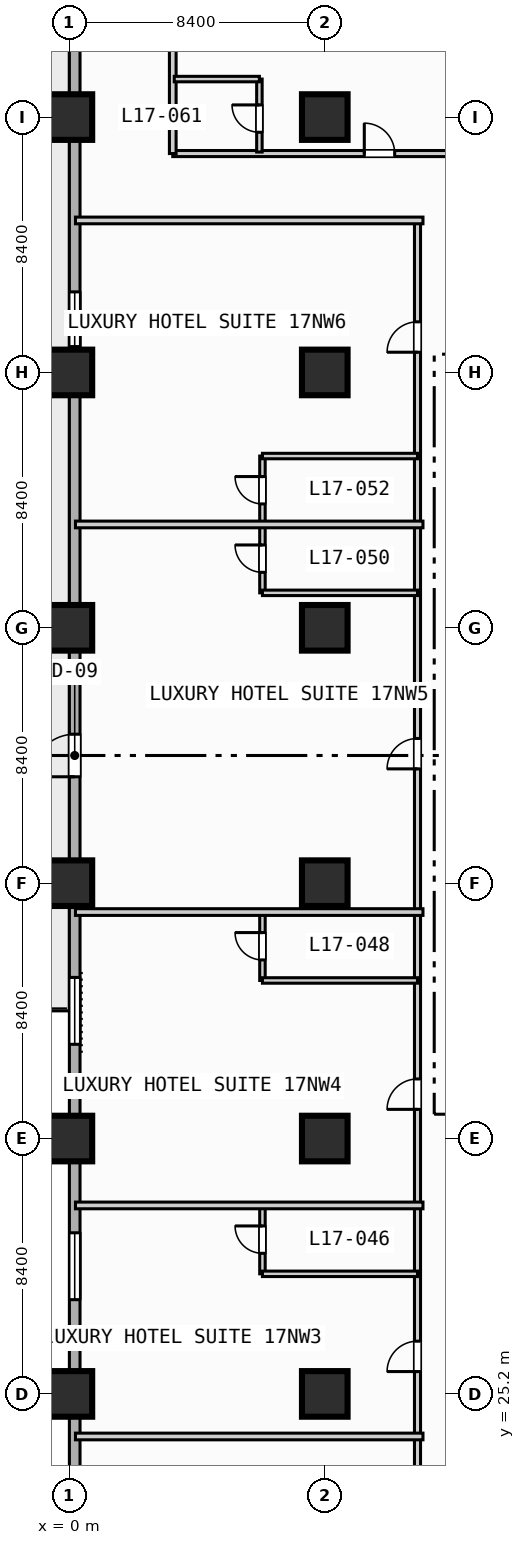
"""IFC4 building model, lengths in metres.
Left out: names, types, materials, properties, quantities, classifications, styles, units other than length and angle.
Written with IfcOpenShell. Run it as: python <this file> out.ifc"""

import sys

from ifc_helpers import new_model, si_unit, direction, frame, frame_2d, origin, origin_2d, place, context, subcontext, project, spatial, rectangle, extrude, element, fill, save


model = new_model("IFC4")
c1 = context("Model", 3, precision=1e-05, world=origin(), true_north=direction((0.0, 1.0)))
c2 = subcontext(c1, "Body", "Model", "MODEL_VIEW")
j1 = project(units=[si_unit("LENGTHUNIT", "METRE"), si_unit("PLANEANGLEUNIT", "RADIAN")], contexts=[c1])
p1 = place(None, origin())
s1 = spatial("IfcSite", under=j1, at=p1, CompositionType="ELEMENT")
p2 = place(p1, origin())
s2 = spatial("IfcBuilding", under=s1, at=p2, CompositionType="ELEMENT")
p3 = place(p2, frame((0.0, 0.0, 73.8)))
s3 = spatial("IfcBuildingStorey", under=s2, at=p3, CompositionType="ELEMENT", Elevation=73.8)
for number, where, z_axis, x_axis in (
    (1, (0.0, 25.2, 0.0), (0.0, 0.0, 1.0), (1.0, 0.0, 0.0)),
    (2, (0.0, 33.6, 0.0), (0.0, 0.0, 1.0), (1.0, 0.0, 0.0)),
    (3, (0.0, 42.0, 0.0), (0.0, 0.0, 1.0), (1.0, 0.0, 0.0)),
    (4, (0.0, 50.4, 0.0), (0.0, 0.0, 1.0), (1.0, 0.0, 0.0)),
    (5, (0.0, 58.8, 0.0), (0.0, 0.0, 1.0), (1.0, 0.0, 0.0)),
    (6, (0.0, 67.2, 0.0), (0.0, 0.0, 1.0), (1.0, 0.0, 0.0)),
    (7, (8.4, 25.2, 0.0), (0.0, 0.0, 1.0), (1.0, 0.0, 0.0)),
    (8, (8.4, 33.6, 0.0), (0.0, 0.0, 1.0), (1.0, 0.0, 0.0)),
    (9, (8.4, 42.0, 0.0), (0.0, 0.0, 1.0), (1.0, 0.0, 0.0)),
    (10, (8.4, 50.4, 0.0), (0.0, 0.0, 1.0), (1.0, 0.0, 0.0)),
    (11, (8.4, 58.8, 0.0), (0.0, 0.0, 1.0), (1.0, 0.0, 0.0)),
    (12, (8.4, 67.2, 0.0), (0.0, 0.0, 1.0), (1.0, 0.0, 0.0)),
):
    element("IfcColumn", number, at=place(p3, frame(where, z_axis=z_axis, x_axis=x_axis)), inside=s3, PredefinedType="COLUMN", context=c2, shape_type="SweptSolid", body=[
        extrude(rectangle(XDim=1.5, YDim=1.5, at=origin_2d()), origin(), (0.0, 0.0, 1.0), 3.8),
    ])
p4 = place(p3, frame((0.175, 3.175, 0.0), z_axis=(0.0, 0.0, 1.0), x_axis=(0.0, 1.0, 0.0)))
e13 = element("IfcWall", 13, at=p4, inside=s3, PredefinedType="STANDARD", context=c2, shape_type="SweptSolid", body=[
    extrude(rectangle(XDim=86.05, YDim=0.35, at=frame_2d((43.025, 0.0))), origin(), (0.0, 0.0, 1.0), 3.55),
])
p5 = place(p4, frame((42.325, 0.0, 0.0)))
e14 = element("IfcOpeningElement", 14, at=p5, cuts=e13, PredefinedType="OPENING", context=c2, shape_type="SweptSolid", body=[
    extrude(rectangle(XDim=1.4, YDim=2.2, at=frame_2d((0.7, 1.1))), frame((0.0, 0.185, 0.0), z_axis=(0.0, -1.0, 0.0), x_axis=(1.0, 0.0, 0.0)), (0.0, 0.0, 1.0), 0.37),
])
p6 = place(p4, frame((8.325, 0.0, 0.85)))
e15 = element("IfcOpeningElement", 15, at=p6, cuts=e13, PredefinedType="OPENING", context=c2, shape_type="SweptSolid", body=[
    extrude(rectangle(XDim=2.2, YDim=1.8, at=frame_2d((1.1, 0.9))), frame((0.0, 0.185, 0.0), z_axis=(0.0, -1.0, 0.0), x_axis=(1.0, 0.0, 0.0)), (0.0, 0.0, 1.0), 0.37),
])
p7 = place(p4, frame((16.725, 0.0, 0.85)))
e16 = element("IfcOpeningElement", 16, at=p7, cuts=e13, PredefinedType="OPENING", context=c2, shape_type="SweptSolid", body=[
    extrude(rectangle(XDim=2.2, YDim=1.8, at=frame_2d((1.1, 0.9))), frame((0.0, 0.185, 0.0), z_axis=(0.0, -1.0, 0.0), x_axis=(1.0, 0.0, 0.0)), (0.0, 0.0, 1.0), 0.37),
])
p8 = place(p4, frame((25.125, 0.0, 0.85)))
e17 = element("IfcOpeningElement", 17, at=p8, cuts=e13, PredefinedType="OPENING", context=c2, shape_type="SweptSolid", body=[
    extrude(rectangle(XDim=2.2, YDim=1.8, at=frame_2d((1.1, 0.9))), frame((0.0, 0.185, 0.0), z_axis=(0.0, -1.0, 0.0), x_axis=(1.0, 0.0, 0.0)), (0.0, 0.0, 1.0), 0.37),
])
p9 = place(p4, frame((33.525, 0.0, 0.85)))
e18 = element("IfcOpeningElement", 18, at=p9, cuts=e13, PredefinedType="OPENING", context=c2, shape_type="SweptSolid", body=[
    extrude(rectangle(XDim=2.2, YDim=1.8, at=frame_2d((1.1, 0.9))), frame((0.0, 0.185, 0.0), z_axis=(0.0, -1.0, 0.0), x_axis=(1.0, 0.0, 0.0)), (0.0, 0.0, 1.0), 0.37),
])
p10 = place(p4, frame((2.375, 0.0, 0.85)))
e19 = element("IfcOpeningElement", 19, at=p10, cuts=e13, PredefinedType="OPENING", context=c2, shape_type="SweptSolid", body=[
    extrude(rectangle(XDim=1.8, YDim=1.8, at=frame_2d((0.9, 0.9))), frame((0.0, 0.185, 0.0), z_axis=(0.0, -1.0, 0.0), x_axis=(1.0, 0.0, 0.0)), (0.0, 0.0, 1.0), 0.37),
])
p11 = place(p4, frame((56.475, 0.0, 0.85)))
e20 = element("IfcOpeningElement", 20, at=p11, cuts=e13, PredefinedType="OPENING", context=c2, shape_type="SweptSolid", body=[
    extrude(rectangle(XDim=1.8, YDim=1.8, at=frame_2d((0.9, 0.9))), frame((0.0, 0.185, 0.0), z_axis=(0.0, -1.0, 0.0), x_axis=(1.0, 0.0, 0.0)), (0.0, 0.0, 1.0), 0.37),
])
p12 = place(p3, frame((11.45, 3.4, 0.0), z_axis=(0.0, 0.0, 1.0), x_axis=(0.0, 1.0, 0.0)))
e21 = element("IfcWall", 21, at=p12, inside=s3, PredefinedType="PARTITIONING", context=c2, shape_type="SweptSolid", body=[
    extrude(rectangle(XDim=60.4, YDim=0.2, at=frame_2d((30.2, 0.0))), origin(), (0.0, 0.0, 1.0), 3.55),
])
p13 = place(p12, frame((4.465, 0.0, 0.0)))
e22 = element("IfcOpeningElement", 22, at=p13, cuts=e21, PredefinedType="OPENING", context=c2, shape_type="SweptSolid", body=[
    extrude(rectangle(XDim=1.0, YDim=2.15, at=frame_2d((0.5, 1.075))), frame((0.0, 0.11, 0.0), z_axis=(0.0, -1.0, 0.0), x_axis=(1.0, 0.0, 0.0)), (0.0, 0.0, 1.0), 0.22),
])
p14 = place(p12, frame((14.665, 0.0, 0.0)))
e23 = element("IfcOpeningElement", 23, at=p14, cuts=e21, PredefinedType="OPENING", context=c2, shape_type="SweptSolid", body=[
    extrude(rectangle(XDim=1.0, YDim=2.15, at=frame_2d((0.5, 1.075))), frame((0.0, 0.11, 0.0), z_axis=(0.0, -1.0, 0.0), x_axis=(1.0, 0.0, 0.0)), (0.0, 0.0, 1.0), 0.22),
])
p15 = place(p12, frame((22.535, 0.0, 0.0)))
e24 = element("IfcOpeningElement", 24, at=p15, cuts=e21, PredefinedType="OPENING", context=c2, shape_type="SweptSolid", body=[
    extrude(rectangle(XDim=1.0, YDim=2.15, at=frame_2d((0.5, 1.075))), frame((0.0, 0.11, 0.0), z_axis=(0.0, -1.0, 0.0), x_axis=(1.0, 0.0, 0.0)), (0.0, 0.0, 1.0), 0.22),
])
p16 = place(p12, frame((31.16, 0.0, 0.0)))
e25 = element("IfcOpeningElement", 25, at=p16, cuts=e21, PredefinedType="OPENING", context=c2, shape_type="SweptSolid", body=[
    extrude(rectangle(XDim=1.0, YDim=2.15, at=frame_2d((0.5, 1.075))), frame((0.0, 0.11, 0.0), z_axis=(0.0, -1.0, 0.0), x_axis=(1.0, 0.0, 0.0)), (0.0, 0.0, 1.0), 0.22),
])
p17 = place(p12, frame((42.36, 0.0, 0.0)))
e26 = element("IfcOpeningElement", 26, at=p17, cuts=e21, PredefinedType="OPENING", context=c2, shape_type="SweptSolid", body=[
    extrude(rectangle(XDim=1.0, YDim=2.15, at=frame_2d((0.5, 1.075))), frame((0.0, 0.11, 0.0), z_axis=(0.0, -1.0, 0.0), x_axis=(1.0, 0.0, 0.0)), (0.0, 0.0, 1.0), 0.22),
])
p18 = place(p12, frame((56.065, 0.0, 0.0)))
e27 = element("IfcOpeningElement", 27, at=p18, cuts=e21, PredefinedType="OPENING", context=c2, shape_type="SweptSolid", body=[
    extrude(rectangle(XDim=1.0, YDim=2.15, at=frame_2d((0.5, 1.075))), frame((0.0, 0.11, 0.0), z_axis=(0.0, -1.0, 0.0), x_axis=(1.0, 0.0, 0.0)), (0.0, 0.0, 1.0), 0.22),
])
p19 = place(p3, frame((0.2, 23.8, 0.0), z_axis=(0.0, 0.0, 1.0), x_axis=(1.0, 0.0, 0.0)))
e28 = element("IfcWall", 28, at=p19, inside=s3, PredefinedType="PARTITIONING", context=c2, shape_type="SweptSolid", body=[
    extrude(rectangle(XDim=11.43, YDim=0.22, at=frame_2d((5.715, 0.0))), origin(), (0.0, 0.0, 1.0), 3.55),
])
p20 = place(p3, frame((6.35, 29.15, 0.0), z_axis=(0.0, 0.0, 1.0), x_axis=(0.0, 1.0, 0.0)))
e29 = element("IfcWall", 29, at=p20, inside=s3, PredefinedType="PLUMBINGWALL", context=c2, shape_type="SweptSolid", body=[
    extrude(rectangle(XDim=2.25, YDim=0.18, at=frame_2d((1.125, 0.0))), origin(), (0.0, 0.0, 1.0), 3.55),
])
p21 = place(p20, frame((0.675, 0.0, 0.0)))
e30 = element("IfcOpeningElement", 30, at=p21, cuts=e29, PredefinedType="OPENING", context=c2, shape_type="SweptSolid", body=[
    extrude(rectangle(XDim=0.9, YDim=2.1, at=frame_2d((0.45, 1.05))), frame((0.0, 0.1, 0.0), z_axis=(0.0, -1.0, 0.0), x_axis=(1.0, 0.0, 0.0)), (0.0, 0.0, 1.0), 0.2),
])
p22 = place(p3, frame((6.35, 29.15, 0.0), z_axis=(0.0, 0.0, 1.0), x_axis=(1.0, 0.0, 0.0)))
e31 = element("IfcWall", 31, at=p22, inside=s3, PredefinedType="PLUMBINGWALL", context=c2, shape_type="SweptSolid", body=[
    extrude(rectangle(XDim=5.1, YDim=0.18, at=frame_2d((2.55, 0.0))), origin(), (0.0, 0.0, 1.0), 3.55),
])
p23 = place(p3, frame((0.2, 31.4, 0.0), z_axis=(0.0, 0.0, 1.0), x_axis=(1.0, 0.0, 0.0)))
e32 = element("IfcWall", 32, at=p23, inside=s3, PredefinedType="PARTITIONING", context=c2, shape_type="SweptSolid", body=[
    extrude(rectangle(XDim=11.43, YDim=0.22, at=frame_2d((5.715, 0.0))), origin(), (0.0, 0.0, 1.0), 3.55),
])
p24 = place(p3, frame((6.35, 38.8, 0.0), z_axis=(0.0, 0.0, 1.0), x_axis=(0.0, 1.0, 0.0)))
e33 = element("IfcWall", 33, at=p24, inside=s3, PredefinedType="PLUMBINGWALL", context=c2, shape_type="SweptSolid", body=[
    extrude(rectangle(XDim=2.25, YDim=0.18, at=frame_2d((1.125, 0.0))), origin(), (0.0, 0.0, 1.0), 3.55),
])
p25 = place(p24, frame((0.675, 0.0, 0.0)))
e34 = element("IfcOpeningElement", 34, at=p25, cuts=e33, PredefinedType="OPENING", context=c2, shape_type="SweptSolid", body=[
    extrude(rectangle(XDim=0.9, YDim=2.1, at=frame_2d((0.45, 1.05))), frame((0.0, 0.1, 0.0), z_axis=(0.0, -1.0, 0.0), x_axis=(1.0, 0.0, 0.0)), (0.0, 0.0, 1.0), 0.2),
])
p26 = place(p3, frame((6.35, 38.8, 0.0), z_axis=(0.0, 0.0, 1.0), x_axis=(1.0, 0.0, 0.0)))
e35 = element("IfcWall", 35, at=p26, inside=s3, PredefinedType="PLUMBINGWALL", context=c2, shape_type="SweptSolid", body=[
    extrude(rectangle(XDim=5.1, YDim=0.18, at=frame_2d((2.55, 0.0))), origin(), (0.0, 0.0, 1.0), 3.55),
])
p27 = place(p3, frame((0.2, 41.05, 0.0), z_axis=(0.0, 0.0, 1.0), x_axis=(1.0, 0.0, 0.0)))
e36 = element("IfcWall", 36, at=p27, inside=s3, PredefinedType="PARTITIONING", context=c2, shape_type="SweptSolid", body=[
    extrude(rectangle(XDim=11.43, YDim=0.22, at=frame_2d((5.715, 0.0))), origin(), (0.0, 0.0, 1.0), 3.55),
])
p28 = place(p3, frame((6.35, 51.55, 0.0), z_axis=(0.0, 0.0, 1.0), x_axis=(0.0, 1.0, 0.0)))
e37 = element("IfcWall", 37, at=p28, inside=s3, PredefinedType="PLUMBINGWALL", context=c2, shape_type="SweptSolid", body=[
    extrude(rectangle(XDim=4.5, YDim=0.18, at=frame_2d((2.25, 0.0))), origin(), (0.0, 0.0, 1.0), 3.55),
])
p29 = place(p28, frame((0.675, 0.0, 0.0)))
e38 = element("IfcOpeningElement", 38, at=p29, cuts=e37, PredefinedType="OPENING", context=c2, shape_type="SweptSolid", body=[
    extrude(rectangle(XDim=0.9, YDim=2.1, at=frame_2d((0.45, 1.05))), frame((0.0, 0.1, 0.0), z_axis=(0.0, -1.0, 0.0), x_axis=(1.0, 0.0, 0.0)), (0.0, 0.0, 1.0), 0.2),
])
p30 = place(p28, frame((2.925, 0.0, 0.0)))
e39 = element("IfcOpeningElement", 39, at=p30, cuts=e37, PredefinedType="OPENING", context=c2, shape_type="SweptSolid", body=[
    extrude(rectangle(XDim=0.9, YDim=2.1, at=frame_2d((0.45, 1.05))), frame((0.0, 0.1, 0.0), z_axis=(0.0, -1.0, 0.0), x_axis=(1.0, 0.0, 0.0)), (0.0, 0.0, 1.0), 0.2),
])
p31 = place(p3, frame((6.35, 51.55, 0.0), z_axis=(0.0, 0.0, 1.0), x_axis=(1.0, 0.0, 0.0)))
e40 = element("IfcWall", 40, at=p31, inside=s3, PredefinedType="PLUMBINGWALL", context=c2, shape_type="SweptSolid", body=[
    extrude(rectangle(XDim=5.1, YDim=0.18, at=frame_2d((2.55, 0.0))), origin(), (0.0, 0.0, 1.0), 3.55),
])
for number, where, z_axis, x_axis in (
    (41, (0.2, 53.8, 0.0), (0.0, 0.0, 1.0), (1.0, 0.0, 0.0)),
    (42, (0.2, 63.8, 0.0), (0.0, 0.0, 1.0), (1.0, 0.0, 0.0)),
):
    element("IfcWall", number, at=place(p3, frame(where, z_axis=z_axis, x_axis=x_axis)), inside=s3, PredefinedType="PARTITIONING", context=c2, shape_type="SweptSolid", body=[
        extrude(rectangle(XDim=11.43, YDim=0.22, at=frame_2d((5.715, 0.0))), origin(), (0.0, 0.0, 1.0), 3.55),
    ])
p32 = place(p3, frame((6.35, 56.05, 0.0), z_axis=(0.0, 0.0, 1.0), x_axis=(1.0, 0.0, 0.0)))
e43 = element("IfcWall", 43, at=p32, inside=s3, PredefinedType="PLUMBINGWALL", context=c2, shape_type="SweptSolid", body=[
    extrude(rectangle(XDim=5.1, YDim=0.18, at=frame_2d((2.55, 0.0))), origin(), (0.0, 0.0, 1.0), 3.55),
])
p33 = place(p3, frame((3.4, 66.0, 0.0), z_axis=(0.0, 0.0, 1.0), x_axis=(1.0, 0.0, 0.0)))
e44 = element("IfcWall", 44, at=p33, inside=s3, PredefinedType="PARTITIONING", context=c2, shape_type="SweptSolid", body=[
    extrude(rectangle(XDim=18.2, YDim=0.2, at=frame_2d((9.1, 0.0))), origin(), (0.0, 0.0, 1.0), 3.55),
])
p34 = place(p33, frame((6.3, 0.0, 0.0)))
e45 = element("IfcOpeningElement", 45, at=p34, cuts=e44, PredefinedType="OPENING", context=c2, shape_type="SweptSolid", body=[
    extrude(rectangle(XDim=1.0, YDim=2.15, at=frame_2d((0.5, 1.075))), frame((0.0, 0.11, 0.0), z_axis=(0.0, -1.0, 0.0), x_axis=(1.0, 0.0, 0.0)), (0.0, 0.0, 1.0), 0.22),
])
p35 = place(p3, frame((3.4, 66.0, 0.0), z_axis=(0.0, 0.0, 1.0), x_axis=(0.0, 1.0, 0.0)))
e46 = element("IfcWall", 46, at=p35, inside=s3, PredefinedType="PARTITIONING", context=c2, shape_type="SweptSolid", body=[
    extrude(rectangle(XDim=23.0, YDim=0.22, at=frame_2d((11.5, 0.0))), origin(), (0.0, 0.0, 1.0), 3.55),
])
p36 = place(p3, frame((6.25, 66.05, 0.0), z_axis=(0.0, 0.0, 1.0), x_axis=(0.0, 1.0, 0.0)))
e47 = element("IfcWall", 47, at=p36, inside=s3, PredefinedType="PLUMBINGWALL", context=c2, shape_type="SweptSolid", body=[
    extrude(rectangle(XDim=2.4, YDim=0.18, at=frame_2d((1.2, 0.0))), origin(), (0.0, 0.0, 1.0), 3.55),
])
p37 = place(p36, frame((0.65, 0.0, 0.0)))
e48 = element("IfcOpeningElement", 48, at=p37, cuts=e47, PredefinedType="OPENING", context=c2, shape_type="SweptSolid", body=[
    extrude(rectangle(XDim=0.9, YDim=2.1, at=frame_2d((0.45, 1.05))), frame((0.0, 0.1, 0.0), z_axis=(0.0, -1.0, 0.0), x_axis=(1.0, 0.0, 0.0)), (0.0, 0.0, 1.0), 0.2),
])
p38 = place(p3, frame((3.45, 68.45, 0.0), z_axis=(0.0, 0.0, 1.0), x_axis=(1.0, 0.0, 0.0)))
e49 = element("IfcWall", 49, at=p38, inside=s3, PredefinedType="PLUMBINGWALL", context=c2, shape_type="SweptSolid", body=[
    extrude(rectangle(XDim=2.8, YDim=0.18, at=frame_2d((1.4, 0.0))), origin(), (0.0, 0.0, 1.0), 3.55),
])
p39 = place(p5, origin())
e50 = element("IfcDoor", 50, at=p39, inside=s3, OperationType="SINGLE_SWING_LEFT", PredefinedType="DOOR", context=c2, shape_type="SweptSolid", body=[
    extrude(rectangle(XDim=1.4, YDim=2.2, at=frame_2d((0.7, 1.1))), frame((0.0, 0.025, 0.0), z_axis=(0.0, -1.0, 0.0), x_axis=(1.0, 0.0, 0.0)), (0.0, 0.0, 1.0), 0.05),
])
fill(e14, e50)
p40 = place(p8, origin())
e51 = element("IfcWindow", 51, at=p40, inside=s3, PartitioningType="SINGLE_PANEL", PredefinedType="WINDOW", context=c2, shape_type="SweptSolid", body=[
    extrude(rectangle(XDim=2.2, YDim=1.8, at=frame_2d((1.1, 0.9))), frame((0.0, 0.03, 0.0), z_axis=(0.0, -1.0, 0.0), x_axis=(1.0, 0.0, 0.0)), (0.0, 0.0, 1.0), 0.06),
])
fill(e17, e51)
p41 = place(p9, origin())
e52 = element("IfcWindow", 52, at=p41, inside=s3, PartitioningType="SINGLE_PANEL", PredefinedType="WINDOW", context=c2, shape_type="SweptSolid", body=[
    extrude(rectangle(XDim=2.2, YDim=1.8, at=frame_2d((1.1, 0.9))), frame((0.0, 0.03, 0.0), z_axis=(0.0, -1.0, 0.0), x_axis=(1.0, 0.0, 0.0)), (0.0, 0.0, 1.0), 0.06),
])
fill(e18, e52)
p42 = place(p11, origin())
e53 = element("IfcWindow", 53, at=p42, inside=s3, PartitioningType="SINGLE_PANEL", PredefinedType="WINDOW", context=c2, shape_type="SweptSolid", body=[
    extrude(rectangle(XDim=1.8, YDim=1.8, at=frame_2d((0.9, 0.9))), frame((0.0, 0.03, 0.0), z_axis=(0.0, -1.0, 0.0), x_axis=(1.0, 0.0, 0.0)), (0.0, 0.0, 1.0), 0.06),
])
fill(e20, e53)
p43 = place(p15, origin())
e54 = element("IfcDoor", 54, at=p43, inside=s3, OperationType="SINGLE_SWING_LEFT", PredefinedType="DOOR", context=c2, shape_type="SweptSolid", body=[
    extrude(rectangle(XDim=1.0, YDim=2.15, at=frame_2d((0.5, 1.075))), frame((0.0, 0.025, 0.0), z_axis=(0.0, -1.0, 0.0), x_axis=(1.0, 0.0, 0.0)), (0.0, 0.0, 1.0), 0.05),
])
fill(e24, e54)
p44 = place(p16, origin())
e55 = element("IfcDoor", 55, at=p44, inside=s3, OperationType="SINGLE_SWING_LEFT", PredefinedType="DOOR", context=c2, shape_type="SweptSolid", body=[
    extrude(rectangle(XDim=1.0, YDim=2.15, at=frame_2d((0.5, 1.075))), frame((0.0, 0.025, 0.0), z_axis=(0.0, -1.0, 0.0), x_axis=(1.0, 0.0, 0.0)), (0.0, 0.0, 1.0), 0.05),
])
fill(e25, e55)
p45 = place(p17, origin())
e56 = element("IfcDoor", 56, at=p45, inside=s3, OperationType="SINGLE_SWING_LEFT", PredefinedType="DOOR", context=c2, shape_type="SweptSolid", body=[
    extrude(rectangle(XDim=1.0, YDim=2.15, at=frame_2d((0.5, 1.075))), frame((0.0, 0.025, 0.0), z_axis=(0.0, -1.0, 0.0), x_axis=(1.0, 0.0, 0.0)), (0.0, 0.0, 1.0), 0.05),
])
fill(e26, e56)
p46 = place(p18, origin())
e57 = element("IfcDoor", 57, at=p46, inside=s3, OperationType="SINGLE_SWING_LEFT", PredefinedType="DOOR", context=c2, shape_type="SweptSolid", body=[
    extrude(rectangle(XDim=1.0, YDim=2.15, at=frame_2d((0.5, 1.075))), frame((0.0, 0.025, 0.0), z_axis=(0.0, -1.0, 0.0), x_axis=(1.0, 0.0, 0.0)), (0.0, 0.0, 1.0), 0.05),
])
fill(e27, e57)
p47 = place(p21, origin())
e58 = element("IfcDoor", 58, at=p47, inside=s3, OperationType="SINGLE_SWING_RIGHT", PredefinedType="DOOR", context=c2, shape_type="SweptSolid", body=[
    extrude(rectangle(XDim=0.9, YDim=2.1, at=frame_2d((0.45, 1.05))), frame((0.0, 0.025, 0.0), z_axis=(0.0, -1.0, 0.0), x_axis=(1.0, 0.0, 0.0)), (0.0, 0.0, 1.0), 0.05),
])
fill(e30, e58)
p48 = place(p25, origin())
e59 = element("IfcDoor", 59, at=p48, inside=s3, OperationType="SINGLE_SWING_RIGHT", PredefinedType="DOOR", context=c2, shape_type="SweptSolid", body=[
    extrude(rectangle(XDim=0.9, YDim=2.1, at=frame_2d((0.45, 1.05))), frame((0.0, 0.025, 0.0), z_axis=(0.0, -1.0, 0.0), x_axis=(1.0, 0.0, 0.0)), (0.0, 0.0, 1.0), 0.05),
])
fill(e34, e59)
p49 = place(p29, origin())
e60 = element("IfcDoor", 60, at=p49, inside=s3, OperationType="SINGLE_SWING_RIGHT", PredefinedType="DOOR", context=c2, shape_type="SweptSolid", body=[
    extrude(rectangle(XDim=0.9, YDim=2.1, at=frame_2d((0.45, 1.05))), frame((0.0, 0.025, 0.0), z_axis=(0.0, -1.0, 0.0), x_axis=(1.0, 0.0, 0.0)), (0.0, 0.0, 1.0), 0.05),
])
fill(e38, e60)
p50 = place(p30, origin())
e61 = element("IfcDoor", 61, at=p50, inside=s3, OperationType="SINGLE_SWING_RIGHT", PredefinedType="DOOR", context=c2, shape_type="SweptSolid", body=[
    extrude(rectangle(XDim=0.9, YDim=2.1, at=frame_2d((0.45, 1.05))), frame((0.0, 0.025, 0.0), z_axis=(0.0, -1.0, 0.0), x_axis=(1.0, 0.0, 0.0)), (0.0, 0.0, 1.0), 0.05),
])
fill(e39, e61)
p51 = place(p34, origin())
e62 = element("IfcDoor", 62, at=p51, inside=s3, OperationType="SINGLE_SWING_LEFT", PredefinedType="DOOR", context=c2, shape_type="SweptSolid", body=[
    extrude(rectangle(XDim=1.0, YDim=2.15, at=frame_2d((0.5, 1.075))), frame((0.0, 0.025, 0.0), z_axis=(0.0, -1.0, 0.0), x_axis=(1.0, 0.0, 0.0)), (0.0, 0.0, 1.0), 0.05),
])
fill(e45, e62)
p52 = place(p37, origin())
e63 = element("IfcDoor", 63, at=p52, inside=s3, OperationType="SINGLE_SWING_RIGHT", PredefinedType="DOOR", context=c2, shape_type="SweptSolid", body=[
    extrude(rectangle(XDim=0.9, YDim=2.1, at=frame_2d((0.45, 1.05))), frame((0.0, 0.025, 0.0), z_axis=(0.0, -1.0, 0.0), x_axis=(1.0, 0.0, 0.0)), (0.0, 0.0, 1.0), 0.05),
])
fill(e48, e63)
save(model, sys.argv[1])
